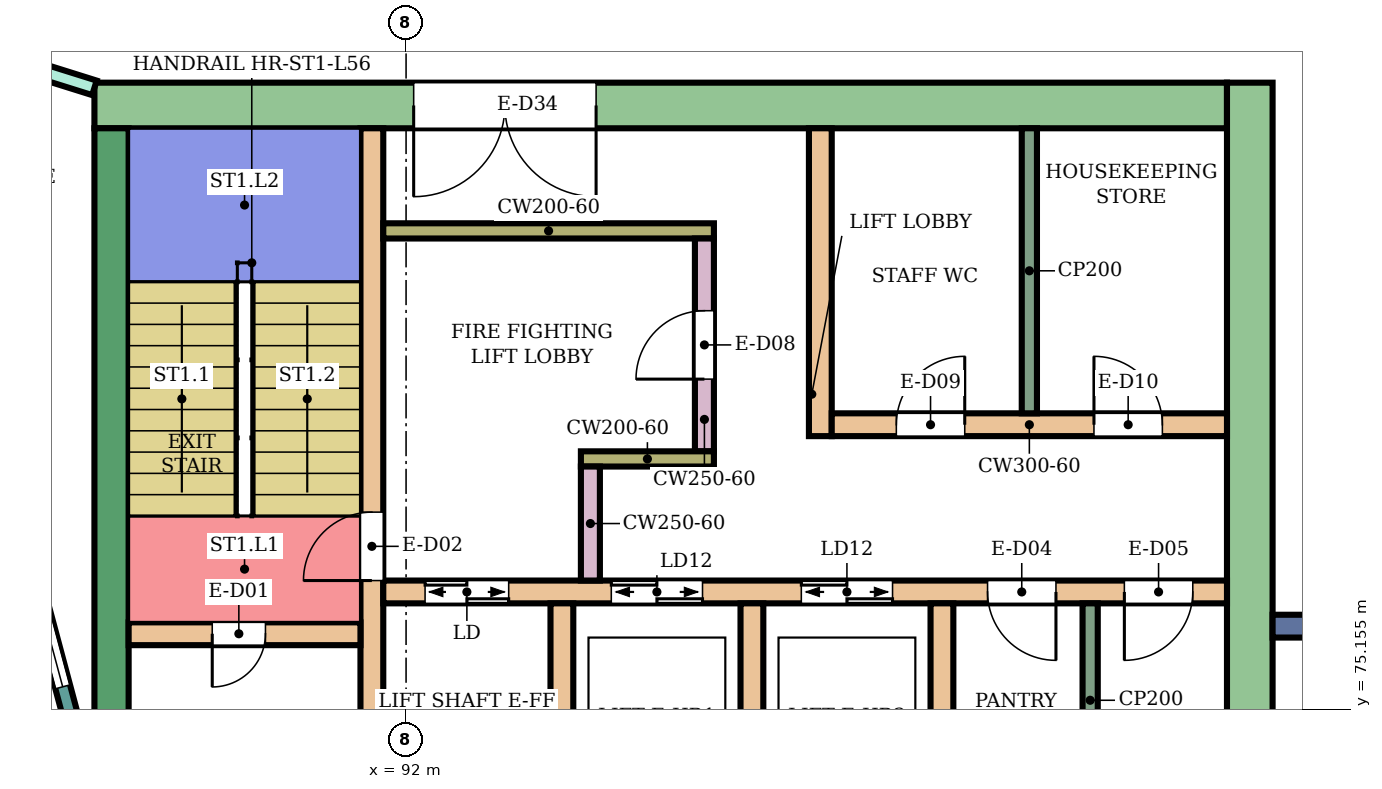
"""IFC4 building model, lengths in metres.
Left out: names, types, materials, properties, quantities, classifications, styles, units other than length and angle.
Written with IfcOpenShell. Run it as: python <this file> out.ifc"""

import sys

from ifc_helpers import new_model, si_unit, direction, frame, frame_2d, origin, place, context, subcontext, project, spatial, rectangle, extrude, element, fill, save


model = new_model("IFC4")
c1 = context("Model", 3, precision=1e-05, world=origin(), true_north=direction((0.0, 1.0)))
c2 = subcontext(c1, "Body", "Model", "MODEL_VIEW")
j1 = project(units=[si_unit("LENGTHUNIT", "METRE"), si_unit("PLANEANGLEUNIT", "RADIAN")], contexts=[c1])
p1 = place(None, origin())
s1 = spatial("IfcSite", under=j1, at=p1, CompositionType="ELEMENT")
p2 = place(p1, origin())
s2 = spatial("IfcBuilding", under=s1, at=p2, CompositionType="ELEMENT")
p3 = place(p2, frame((0.0, 0.0, 245.7)))
s3 = spatial("IfcBuildingStorey", under=s2, at=p3, CompositionType="ELEMENT", Elevation=245.7)
p4 = place(p3, frame((87.9, 83.1, 0.0), z_axis=(0.0, 0.0, 1.0), x_axis=(1.0, 0.0, 0.0)))
e1 = element("IfcWall", 1, at=p4, inside=s3, PredefinedType="SHEAR", context=c2, shape_type="SweptSolid", body=[
    extrude(rectangle(XDim=14.9, YDim=0.6, at=frame_2d((7.45, 0.0))), origin(), (0.0, 0.0, 1.0), 3.88),
])
p5 = place(p4, frame((4.2, 0.0, 0.0)))
e2 = element("IfcOpeningElement", 2, at=p5, cuts=e1, PredefinedType="OPENING", context=c2, shape_type="SweptSolid", body=[
    extrude(rectangle(XDim=2.4, YDim=2.4, at=frame_2d((1.2, 1.2))), frame((0.0, 0.31, 0.0), z_axis=(0.0, -1.0, 0.0), x_axis=(1.0, 0.0, 0.0)), (0.0, 0.0, 1.0), 0.62),
])
p6 = place(p3, frame((88.125, 75.0, 0.0), z_axis=(0.0, 0.0, 1.0), x_axis=(0.0, 1.0, 0.0)))
e3 = element("IfcWall", 3, at=p6, inside=s3, PredefinedType="SHEAR", context=c2, shape_type="SweptSolid", body=[
    extrude(rectangle(XDim=7.8, YDim=0.45, at=frame_2d((3.9, 0.0))), origin(), (0.0, 0.0, 1.0), 3.88),
])
p7 = place(p3, frame((103.1, 66.6, 0.0), z_axis=(0.0, 0.0, 1.0), x_axis=(0.0, 1.0, 0.0)))
e4 = element("IfcWall", 4, at=p7, inside=s3, PredefinedType="SHEAR", context=c2, shape_type="SweptSolid", body=[
    extrude(rectangle(XDim=16.8, YDim=0.6, at=frame_2d((8.4, 0.0))), origin(), (0.0, 0.0, 1.0), 3.88),
])
p8 = place(p3, frame((91.55, 75.0, 0.0), z_axis=(0.0, 0.0, 1.0), x_axis=(0.0, 1.0, 0.0)))
e5 = element("IfcWall", 5, at=p8, inside=s3, PredefinedType="SHEAR", context=c2, shape_type="SweptSolid", body=[
    extrude(rectangle(XDim=7.8, YDim=0.3, at=frame_2d((3.9, 0.0))), origin(), (0.0, 0.0, 1.0), 3.88),
])
p9 = place(p8, frame((1.85, 0.0, 0.0)))
e6 = element("IfcOpeningElement", 6, at=p9, cuts=e5, PredefinedType="OPENING", context=c2, shape_type="SweptSolid", body=[
    extrude(rectangle(XDim=0.9, YDim=2.1, at=frame_2d((0.45, 1.05))), frame((0.0, 0.16, 0.0), z_axis=(0.0, -1.0, 0.0), x_axis=(1.0, 0.0, 0.0)), (0.0, 0.0, 1.0), 0.32),
])
p10 = place(p3, frame((88.35, 76.15, 0.0), z_axis=(0.0, 0.0, 1.0), x_axis=(1.0, 0.0, 0.0)))
e7 = element("IfcWall", 7, at=p10, inside=s3, PredefinedType="SHEAR", context=c2, shape_type="SweptSolid", body=[
    extrude(rectangle(XDim=3.05, YDim=0.3, at=frame_2d((1.525, 0.0))), origin(), (0.0, 0.0, 1.0), 3.88),
])
p11 = place(p10, frame((1.1, 0.0, 0.0)))
e8 = element("IfcOpeningElement", 8, at=p11, cuts=e7, PredefinedType="OPENING", context=c2, shape_type="SweptSolid", body=[
    extrude(rectangle(XDim=0.7, YDim=2.0, at=frame_2d((0.35, 1.0))), frame((0.0, 0.16, 0.0), z_axis=(0.0, -1.0, 0.0), x_axis=(1.0, 0.0, 0.0)), (0.0, 0.0, 1.0), 0.32),
])
p12 = place(p3, frame((91.7, 76.7, 0.0), z_axis=(0.0, 0.0, 1.0), x_axis=(1.0, 0.0, 0.0)))
e9 = element("IfcWall", 9, at=p12, inside=s3, PredefinedType="SHEAR", context=c2, shape_type="SweptSolid", body=[
    extrude(rectangle(XDim=11.1, YDim=0.3, at=frame_2d((5.55, 0.0))), origin(), (0.0, 0.0, 1.0), 3.88),
])
p13 = place(p12, frame((0.55, 0.0, 0.0)))
e10 = element("IfcOpeningElement", 10, at=p13, cuts=e9, PredefinedType="OPENING", context=c2, shape_type="SweptSolid", body=[
    extrude(rectangle(XDim=1.1, YDim=2.1, at=frame_2d((0.55, 1.05))), frame((0.0, 0.16, 0.0), z_axis=(0.0, -1.0, 0.0), x_axis=(1.0, 0.0, 0.0)), (0.0, 0.0, 1.0), 0.32),
])
p14 = place(p12, frame((3.0, 0.0, 0.0)))
e11 = element("IfcOpeningElement", 11, at=p14, cuts=e9, PredefinedType="OPENING", context=c2, shape_type="SweptSolid", body=[
    extrude(rectangle(XDim=1.2, YDim=2.1, at=frame_2d((0.6, 1.05))), frame((0.0, 0.16, 0.0), z_axis=(0.0, -1.0, 0.0), x_axis=(1.0, 0.0, 0.0)), (0.0, 0.0, 1.0), 0.32),
])
p15 = place(p12, frame((5.5, 0.0, 0.0)))
e12 = element("IfcOpeningElement", 12, at=p15, cuts=e9, PredefinedType="OPENING", context=c2, shape_type="SweptSolid", body=[
    extrude(rectangle(XDim=1.2, YDim=2.1, at=frame_2d((0.6, 1.05))), frame((0.0, 0.16, 0.0), z_axis=(0.0, -1.0, 0.0), x_axis=(1.0, 0.0, 0.0)), (0.0, 0.0, 1.0), 0.32),
])
p16 = place(p12, frame((7.95, 0.0, 0.0)))
e13 = element("IfcOpeningElement", 13, at=p16, cuts=e9, PredefinedType="OPENING", context=c2, shape_type="SweptSolid", body=[
    extrude(rectangle(XDim=0.9, YDim=2.1, at=frame_2d((0.45, 1.05))), frame((0.0, 0.16, 0.0), z_axis=(0.0, -1.0, 0.0), x_axis=(1.0, 0.0, 0.0)), (0.0, 0.0, 1.0), 0.32),
])
p17 = place(p12, frame((9.75, 0.0, 0.0)))
e14 = element("IfcOpeningElement", 14, at=p17, cuts=e9, PredefinedType="OPENING", context=c2, shape_type="SweptSolid", body=[
    extrude(rectangle(XDim=0.9, YDim=2.1, at=frame_2d((0.45, 1.05))), frame((0.0, 0.16, 0.0), z_axis=(0.0, -1.0, 0.0), x_axis=(1.0, 0.0, 0.0)), (0.0, 0.0, 1.0), 0.32),
])
for number, where, z_axis, x_axis in (
    (15, (94.05, 74.0, 0.0), (0.0, 0.0, 1.0), (0.0, 1.0, 0.0)),
    (16, (96.55, 74.0, 0.0), (0.0, 0.0, 1.0), (0.0, 1.0, 0.0)),
    (17, (99.05, 74.0, 0.0), (0.0, 0.0, 1.0), (0.0, 1.0, 0.0)),
):
    element("IfcWall", number, at=place(p3, frame(where, z_axis=z_axis, x_axis=x_axis)), inside=s3, PredefinedType="SHEAR", context=c2, shape_type="SweptSolid", body=[
        extrude(rectangle(XDim=2.55, YDim=0.3, at=frame_2d((1.275, 0.0))), origin(), (0.0, 0.0, 1.0), 3.88),
    ])
p18 = place(p3, frame((91.7, 81.45, 0.0), z_axis=(0.0, 0.0, 1.0), x_axis=(1.0, 0.0, 0.0)))
e18 = element("IfcWall", 18, at=p18, inside=s3, PredefinedType="SHEAR", context=c2, shape_type="SweptSolid", body=[
    extrude(rectangle(XDim=4.35, YDim=0.2, at=frame_2d((2.175, 0.0))), origin(), (0.0, 0.0, 1.0), 3.88),
])
p19 = place(p3, frame((95.925, 78.55, 0.0), z_axis=(0.0, 0.0, 1.0), x_axis=(0.0, 1.0, 0.0)))
e19 = element("IfcWall", 19, at=p19, inside=s3, PredefinedType="SHEAR", context=c2, shape_type="SweptSolid", body=[
    extrude(rectangle(XDim=2.8, YDim=0.25, at=frame_2d((1.4, 0.0))), origin(), (0.0, 0.0, 1.0), 3.88),
])
p20 = place(p19, frame((0.95, 0.0, 0.0)))
e20 = element("IfcOpeningElement", 20, at=p20, cuts=e19, PredefinedType="OPENING", context=c2, shape_type="SweptSolid", body=[
    extrude(rectangle(XDim=0.9, YDim=2.1, at=frame_2d((0.45, 1.05))), frame((0.0, 0.135, 0.0), z_axis=(0.0, -1.0, 0.0), x_axis=(1.0, 0.0, 0.0)), (0.0, 0.0, 1.0), 0.27),
])
p21 = place(p3, frame((94.3, 78.45, 0.0), z_axis=(0.0, 0.0, 1.0), x_axis=(1.0, 0.0, 0.0)))
e21 = element("IfcWall", 21, at=p21, inside=s3, PredefinedType="SHEAR", context=c2, shape_type="SweptSolid", body=[
    extrude(rectangle(XDim=1.75, YDim=0.2, at=frame_2d((0.875, 0.0))), origin(), (0.0, 0.0, 1.0), 3.88),
])
p22 = place(p3, frame((94.425, 76.85, 0.0), z_axis=(0.0, 0.0, 1.0), x_axis=(0.0, 1.0, 0.0)))
e22 = element("IfcWall", 22, at=p22, inside=s3, PredefinedType="SHEAR", context=c2, shape_type="SweptSolid", body=[
    extrude(rectangle(XDim=1.5, YDim=0.25, at=frame_2d((0.75, 0.0))), origin(), (0.0, 0.0, 1.0), 3.88),
])
p23 = place(p3, frame((97.45, 78.75, 0.0), z_axis=(0.0, 0.0, 1.0), x_axis=(0.0, 1.0, 0.0)))
e23 = element("IfcWall", 23, at=p23, inside=s3, PredefinedType="SHEAR", context=c2, shape_type="SweptSolid", body=[
    extrude(rectangle(XDim=4.05, YDim=0.3, at=frame_2d((2.025, 0.0))), origin(), (0.0, 0.0, 1.0), 3.88),
])
p24 = place(p3, frame((97.6, 78.9, 0.0), z_axis=(0.0, 0.0, 1.0), x_axis=(1.0, 0.0, 0.0)))
e24 = element("IfcWall", 24, at=p24, inside=s3, PredefinedType="SHEAR", context=c2, shape_type="SweptSolid", body=[
    extrude(rectangle(XDim=5.2, YDim=0.3, at=frame_2d((2.6, 0.0))), origin(), (0.0, 0.0, 1.0), 3.88),
])
p25 = place(p24, frame((0.85, 0.0, 0.0)))
e25 = element("IfcOpeningElement", 25, at=p25, cuts=e24, PredefinedType="OPENING", context=c2, shape_type="SweptSolid", body=[
    extrude(rectangle(XDim=0.9, YDim=2.1, at=frame_2d((0.45, 1.05))), frame((0.0, 0.16, 0.0), z_axis=(0.0, -1.0, 0.0), x_axis=(1.0, 0.0, 0.0)), (0.0, 0.0, 1.0), 0.32),
])
p26 = place(p24, frame((3.45, 0.0, 0.0)))
e26 = element("IfcOpeningElement", 26, at=p26, cuts=e24, PredefinedType="OPENING", context=c2, shape_type="SweptSolid", body=[
    extrude(rectangle(XDim=0.9, YDim=2.1, at=frame_2d((0.45, 1.05))), frame((0.0, 0.16, 0.0), z_axis=(0.0, -1.0, 0.0), x_axis=(1.0, 0.0, 0.0)), (0.0, 0.0, 1.0), 0.32),
])
p27 = place(p3, frame((103.4, 76.25, 0.0), z_axis=(0.0, 0.0, 1.0), x_axis=(1.0, 0.0, 0.0)))
e27 = element("IfcWall", 27, at=p27, inside=s3, PredefinedType="NOTDEFINED", context=c2, shape_type="SweptSolid", body=[
    extrude(rectangle(XDim=2.416, YDim=0.3, at=frame_2d((1.208, 0.0))), origin(), (0.0, 0.0, 1.0), 4.2),
])
p28 = place(p3, frame((87.604, 75.0, 0.0), z_axis=(0.0, 0.0, 1.0), x_axis=(-0.258789828301, 0.965933654434, 0.0)))
e28 = element("IfcWall", 28, at=p28, inside=s3, PredefinedType="NOTDEFINED", context=c2, shape_type="SweptSolid", body=[
    extrude(rectangle(XDim=3.936, YDim=0.2, at=frame_2d((1.968, 0.0))), origin(), (0.0, 0.0, 1.0), 4.2),
])
p29 = place(p28, frame((0.468, 0.0, 0.9)))
e29 = element("IfcOpeningElement", 29, at=p29, cuts=e28, PredefinedType="OPENING", context=c2, shape_type="SweptSolid", body=[
    extrude(rectangle(XDim=3.0, YDim=2.3, at=frame_2d((1.5, 1.15))), frame((0.0, 0.11, 0.0), z_axis=(0.0, -1.0, 0.0), x_axis=(1.0, 0.0, 0.0)), (0.0, 0.0, 1.0), 0.22),
])
p30 = place(p3, frame((85.587, 84.057, 0.0), z_axis=(0.0, 0.0, 1.0), x_axis=(0.954239513179, -0.299043393987, 0.0)))
e30 = element("IfcWall", 30, at=p30, inside=s3, PredefinedType="PARTITIONING", context=c2, shape_type="SweptSolid", body=[
    extrude(rectangle(XDim=2.424, YDim=0.2, at=frame_2d((1.212, 0.0))), origin(), (0.0, 0.0, 1.0), 3.75),
])
p31 = place(p30, frame((0.762, 0.0, 0.0)))
e31 = element("IfcOpeningElement", 31, at=p31, cuts=e30, PredefinedType="OPENING", context=c2, shape_type="SweptSolid", body=[
    extrude(rectangle(XDim=0.9, YDim=2.1, at=frame_2d((0.45, 1.05))), frame((0.0, 0.11, 0.0), z_axis=(0.0, -1.0, 0.0), x_axis=(1.0, 0.0, 0.0)), (0.0, 0.0, 1.0), 0.22),
])
p32 = place(p3, frame((101.0, 74.0, 0.0), z_axis=(0.0, 0.0, 1.0), x_axis=(0.0, 1.0, 0.0)))
e32 = element("IfcWall", 32, at=p32, inside=s3, PredefinedType="PARTITIONING", context=c2, shape_type="SweptSolid", body=[
    extrude(rectangle(XDim=2.55, YDim=0.2, at=frame_2d((1.275, 0.0))), origin(), (0.0, 0.0, 1.0), 3.88),
])
p33 = place(p3, frame((100.2, 79.05, 0.0), z_axis=(0.0, 0.0, 1.0), x_axis=(0.0, 1.0, 0.0)))
e33 = element("IfcWall", 33, at=p33, inside=s3, PredefinedType="PARTITIONING", context=c2, shape_type="SweptSolid", body=[
    extrude(rectangle(XDim=3.75, YDim=0.2, at=frame_2d((1.875, 0.0))), origin(), (0.0, 0.0, 1.0), 3.88),
])
p34 = place(p29, origin())
e34 = element("IfcWindow", 34, at=p34, inside=s3, PartitioningType="SINGLE_PANEL", PredefinedType="WINDOW", context=c2, shape_type="SweptSolid", body=[
    extrude(rectangle(XDim=3.0, YDim=2.3, at=frame_2d((1.5, 1.15))), frame((0.0, 0.03, 0.0), z_axis=(0.0, -1.0, 0.0), x_axis=(1.0, 0.0, 0.0)), (0.0, 0.0, 1.0), 0.06),
])
fill(e29, e34)
p35 = place(p11, frame((0.7, 0.0, 0.0), z_axis=(0.0, 0.0, 1.0), x_axis=(-1.0, 0.0, 0.0)))
e35 = element("IfcDoor", 35, at=p35, inside=s3, OperationType="SINGLE_SWING_RIGHT", PredefinedType="DOOR", context=c2, shape_type="SweptSolid", body=[
    extrude(rectangle(XDim=0.7, YDim=2.0, at=frame_2d((0.35, 1.0))), frame((0.0, 0.025, 0.0), z_axis=(0.0, -1.0, 0.0), x_axis=(1.0, 0.0, 0.0)), (0.0, 0.0, 1.0), 0.05),
])
fill(e8, e35)
p36 = place(p9, origin())
e36 = element("IfcDoor", 36, at=p36, inside=s3, OperationType="SINGLE_SWING_LEFT", PredefinedType="DOOR", context=c2, shape_type="SweptSolid", body=[
    extrude(rectangle(XDim=0.9, YDim=2.1, at=frame_2d((0.45, 1.05))), frame((0.0, 0.025, 0.0), z_axis=(0.0, -1.0, 0.0), x_axis=(1.0, 0.0, 0.0)), (0.0, 0.0, 1.0), 0.05),
])
fill(e6, e36)
p37 = place(p13, origin())
e37 = element("IfcDoor", 37, at=p37, inside=s3, OperationType="DOUBLE_DOOR_SLIDING", PredefinedType="DOOR", context=c2, shape_type="SweptSolid", body=[
    extrude(rectangle(XDim=1.1, YDim=2.1, at=frame_2d((0.55, 1.05))), frame((0.0, 0.025, 0.0), z_axis=(0.0, -1.0, 0.0), x_axis=(1.0, 0.0, 0.0)), (0.0, 0.0, 1.0), 0.05),
])
fill(e10, e37)
p38 = place(p14, origin())
e38 = element("IfcDoor", 38, at=p38, inside=s3, OperationType="DOUBLE_DOOR_SLIDING", PredefinedType="DOOR", context=c2, shape_type="SweptSolid", body=[
    extrude(rectangle(XDim=1.2, YDim=2.1, at=frame_2d((0.6, 1.05))), frame((0.0, 0.025, 0.0), z_axis=(0.0, -1.0, 0.0), x_axis=(1.0, 0.0, 0.0)), (0.0, 0.0, 1.0), 0.05),
])
fill(e11, e38)
p39 = place(p15, origin())
e39 = element("IfcDoor", 39, at=p39, inside=s3, OperationType="DOUBLE_DOOR_SLIDING", PredefinedType="DOOR", context=c2, shape_type="SweptSolid", body=[
    extrude(rectangle(XDim=1.2, YDim=2.1, at=frame_2d((0.6, 1.05))), frame((0.0, 0.025, 0.0), z_axis=(0.0, -1.0, 0.0), x_axis=(1.0, 0.0, 0.0)), (0.0, 0.0, 1.0), 0.05),
])
fill(e12, e39)
p40 = place(p16, frame((0.9, 0.0, 0.0), z_axis=(0.0, 0.0, 1.0), x_axis=(-1.0, 0.0, 0.0)))
e40 = element("IfcDoor", 40, at=p40, inside=s3, OperationType="SINGLE_SWING_LEFT", PredefinedType="DOOR", context=c2, shape_type="SweptSolid", body=[
    extrude(rectangle(XDim=0.9, YDim=2.1, at=frame_2d((0.45, 1.05))), frame((0.0, 0.025, 0.0), z_axis=(0.0, -1.0, 0.0), x_axis=(1.0, 0.0, 0.0)), (0.0, 0.0, 1.0), 0.05),
])
fill(e13, e40)
p41 = place(p17, frame((0.9, 0.0, 0.0), z_axis=(0.0, 0.0, 1.0), x_axis=(-1.0, 0.0, 0.0)))
e41 = element("IfcDoor", 41, at=p41, inside=s3, OperationType="SINGLE_SWING_RIGHT", PredefinedType="DOOR", context=c2, shape_type="SweptSolid", body=[
    extrude(rectangle(XDim=0.9, YDim=2.1, at=frame_2d((0.45, 1.05))), frame((0.0, 0.025, 0.0), z_axis=(0.0, -1.0, 0.0), x_axis=(1.0, 0.0, 0.0)), (0.0, 0.0, 1.0), 0.05),
])
fill(e14, e41)
p42 = place(p20, origin())
e42 = element("IfcDoor", 42, at=p42, inside=s3, OperationType="SINGLE_SWING_LEFT", PredefinedType="DOOR", context=c2, shape_type="SweptSolid", body=[
    extrude(rectangle(XDim=0.9, YDim=2.1, at=frame_2d((0.45, 1.05))), frame((0.0, 0.025, 0.0), z_axis=(0.0, -1.0, 0.0), x_axis=(1.0, 0.0, 0.0)), (0.0, 0.0, 1.0), 0.05),
])
fill(e20, e42)
p43 = place(p25, origin())
e43 = element("IfcDoor", 43, at=p43, inside=s3, OperationType="SINGLE_SWING_RIGHT", PredefinedType="DOOR", context=c2, shape_type="SweptSolid", body=[
    extrude(rectangle(XDim=0.9, YDim=2.1, at=frame_2d((0.45, 1.05))), frame((0.0, 0.025, 0.0), z_axis=(0.0, -1.0, 0.0), x_axis=(1.0, 0.0, 0.0)), (0.0, 0.0, 1.0), 0.05),
])
fill(e25, e43)
p44 = place(p26, origin())
e44 = element("IfcDoor", 44, at=p44, inside=s3, OperationType="SINGLE_SWING_LEFT", PredefinedType="DOOR", context=c2, shape_type="SweptSolid", body=[
    extrude(rectangle(XDim=0.9, YDim=2.1, at=frame_2d((0.45, 1.05))), frame((0.0, 0.025, 0.0), z_axis=(0.0, -1.0, 0.0), x_axis=(1.0, 0.0, 0.0)), (0.0, 0.0, 1.0), 0.05),
])
fill(e26, e44)
p45 = place(p5, frame((2.4, 0.0, 0.0), z_axis=(0.0, 0.0, 1.0), x_axis=(-1.0, 0.0, 0.0)))
e45 = element("IfcDoor", 45, at=p45, inside=s3, OperationType="DOUBLE_DOOR_SINGLE_SWING", PredefinedType="DOOR", context=c2, shape_type="SweptSolid", body=[
    extrude(rectangle(XDim=2.4, YDim=2.4, at=frame_2d((1.2, 1.2))), frame((0.0, 0.025, 0.0), z_axis=(0.0, -1.0, 0.0), x_axis=(1.0, 0.0, 0.0)), (0.0, 0.0, 1.0), 0.05),
])
fill(e2, e45)
save(model, sys.argv[1])
